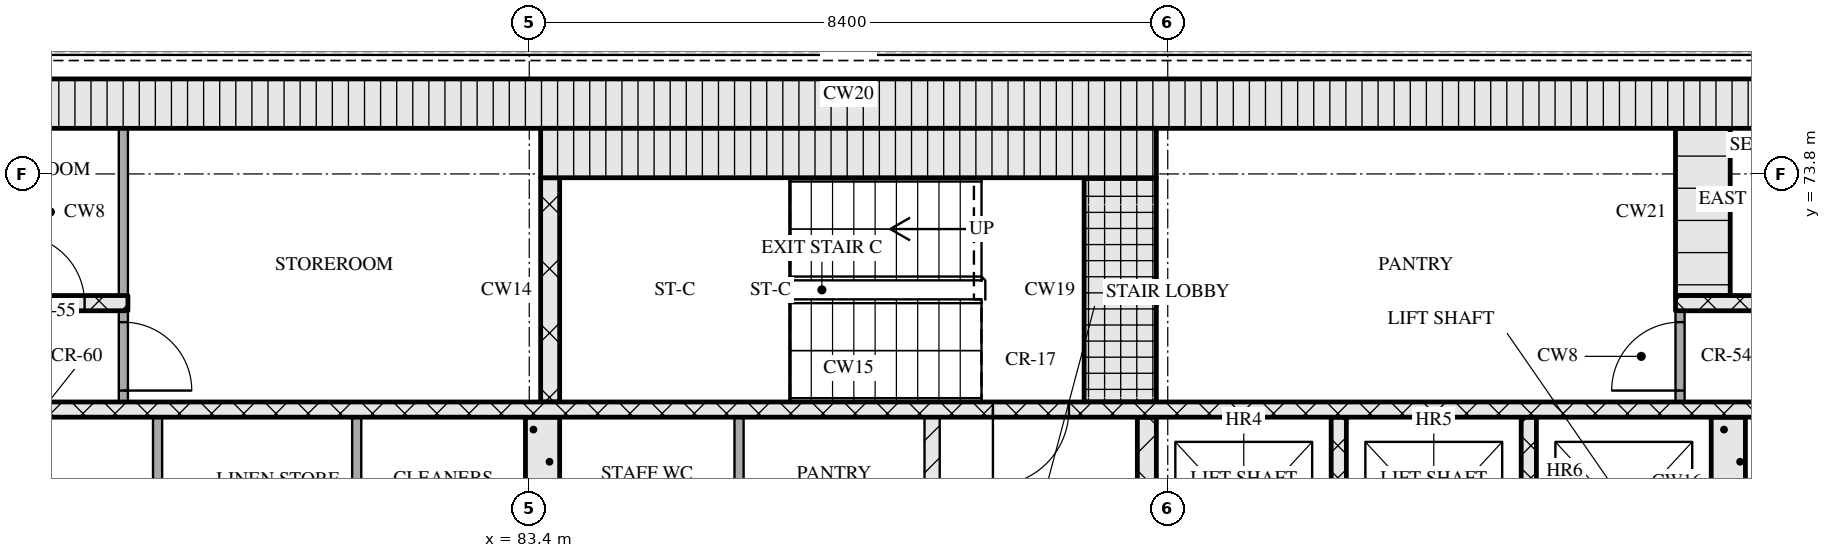
"""IFC4 building model, lengths in metres.
Left out: names, types, materials, properties, quantities, classifications, styles, units other than length and angle.
Written with IfcOpenShell. Run it as: python <this file> out.ifc"""

import sys

from ifc_helpers import new_model, si_unit, direction, frame, frame_2d, origin, place, context, subcontext, project, spatial, rectangle, extrude, element, fill, save


model = new_model("IFC4")
c1 = context("Model", 3, precision=1e-05, world=origin(), true_north=direction((0.0, 1.0)))
c2 = subcontext(c1, "Body", "Model", "MODEL_VIEW")
j1 = project(units=[si_unit("LENGTHUNIT", "METRE"), si_unit("PLANEANGLEUNIT", "RADIAN")], contexts=[c1])
p1 = place(None, origin())
s1 = spatial("IfcSite", under=j1, at=p1, CompositionType="ELEMENT")
p2 = place(p1, origin())
s2 = spatial("IfcBuilding", under=s1, at=p2, CompositionType="ELEMENT")
p3 = place(p2, frame((0.0, 0.0, 245.1)))
s3 = spatial("IfcBuildingStorey", under=s2, at=p3, CompositionType="ELEMENT", Elevation=245.1)
p4 = place(p3, frame((67.15, 74.725, 0.0), z_axis=(0.0, 0.0, 1.0), x_axis=(1.0, 0.0, 0.0)))
e1 = element("IfcWall", 1, at=p4, inside=s3, PredefinedType="SOLIDWALL", context=c2, shape_type="SweptSolid", body=[
    extrude(rectangle(XDim=40.9, YDim=0.65, at=frame_2d((20.45, 0.0))), origin(), (0.0, 0.0, 1.0), 3.32),
])
for number, where, z_axis, x_axis in (
    (2, (78.51, 68.0, 0.0), (0.0, 0.0, 1.0), (0.0, 1.0, 0.0)),
    (3, (81.13, 68.0, 0.0), (0.0, 0.0, 1.0), (0.0, 1.0, 0.0)),
):
    element("IfcWall", number, at=place(p3, frame(where, z_axis=z_axis, x_axis=x_axis)), inside=s3, PredefinedType="PARTITIONING", context=c2, shape_type="SweptSolid", body=[
        extrude(rectangle(XDim=2.6, YDim=0.12, at=frame_2d((1.3, 0.0))), origin(), (0.0, 0.0, 1.0), 3.32),
    ])
p5 = place(p3, frame((83.575, 68.0, 0.0), z_axis=(0.0, 0.0, 1.0), x_axis=(0.0, 1.0, 0.0)))
e4 = element("IfcWall", 4, at=p5, inside=s3, PredefinedType="SOLIDWALL", context=c2, shape_type="SweptSolid", body=[
    extrude(rectangle(XDim=2.6, YDim=0.45, at=frame_2d((1.3, 0.0))), origin(), (0.0, 0.0, 1.0), 3.32),
])
p6 = place(p3, frame((86.16, 68.0, 0.0), z_axis=(0.0, 0.0, 1.0), x_axis=(0.0, 1.0, 0.0)))
e5 = element("IfcWall", 5, at=p6, inside=s3, PredefinedType="PARTITIONING", context=c2, shape_type="SweptSolid", body=[
    extrude(rectangle(XDim=2.6, YDim=0.12, at=frame_2d((1.3, 0.0))), origin(), (0.0, 0.0, 1.0), 3.32),
])
p7 = place(p3, frame((88.7, 68.0, 0.0), z_axis=(0.0, 0.0, 1.0), x_axis=(0.0, 1.0, 0.0)))
e6 = element("IfcWall", 6, at=p7, inside=s3, PredefinedType="PARTITIONING", context=c2, shape_type="SweptSolid", body=[
    extrude(rectangle(XDim=2.6, YDim=0.2, at=frame_2d((1.3, 0.0))), origin(), (0.0, 0.0, 1.0), 3.32),
])
p8 = place(p3, frame((91.525, 68.0, 0.0), z_axis=(0.0, 0.0, 1.0), x_axis=(0.0, 1.0, 0.0)))
e7 = element("IfcWall", 7, at=p8, inside=s3, PredefinedType="SOLIDWALL", context=c2, shape_type="SweptSolid", body=[
    extrude(rectangle(XDim=2.6, YDim=0.25, at=frame_2d((1.3, 0.0))), origin(), (0.0, 0.0, 1.0), 3.32),
])
for number, where, z_axis, x_axis in (
    (8, (94.05, 68.0, 0.0), (0.0, 0.0, 1.0), (0.0, 1.0, 0.0)),
    (9, (96.55, 68.0, 0.0), (0.0, 0.0, 1.0), (0.0, 1.0, 0.0)),
):
    element("IfcWall", number, at=place(p3, frame(where, z_axis=z_axis, x_axis=x_axis)), inside=s3, PredefinedType="SOLIDWALL", context=c2, shape_type="SweptSolid", body=[
        extrude(rectangle(XDim=2.6, YDim=0.2, at=frame_2d((1.3, 0.0))), origin(), (0.0, 0.0, 1.0), 3.32),
    ])
p9 = place(p3, frame((99.175, 68.3, 0.0), z_axis=(0.0, 0.0, 1.0), x_axis=(0.0, 1.0, 0.0)))
e10 = element("IfcWall", 10, at=p9, inside=s3, PredefinedType="SOLIDWALL", context=c2, shape_type="SweptSolid", body=[
    extrude(rectangle(XDim=2.3, YDim=0.45, at=frame_2d((1.15, 0.0))), origin(), (0.0, 0.0, 1.0), 3.32),
])
p10 = place(p3, frame((67.8, 70.7, 0.0), z_axis=(0.0, 0.0, 1.0), x_axis=(1.0, 0.0, 0.0)))
e11 = element("IfcWall", 11, at=p10, inside=s3, PredefinedType="SOLIDWALL", context=c2, shape_type="SweptSolid", body=[
    extrude(rectangle(XDim=39.6, YDim=0.2, at=frame_2d((19.8, 0.0))), origin(), (0.0, 0.0, 1.0), 3.32),
])
p11 = place(p10, frame((0.65, 0.0, 0.0)))
e12 = element("IfcOpeningElement", 12, at=p11, cuts=e11, PredefinedType="OPENING", context=c2, shape_type="SweptSolid", body=[
    extrude(rectangle(XDim=1.1, YDim=2.1, at=frame_2d((0.55, 1.05))), frame((0.0, 0.11, 0.0), z_axis=(0.0, -1.0, 0.0), x_axis=(1.0, 0.0, 0.0)), (0.0, 0.0, 1.0), 0.22),
])
p12 = place(p10, frame((3.25, 0.0, 0.0)))
e13 = element("IfcOpeningElement", 13, at=p12, cuts=e11, PredefinedType="OPENING", context=c2, shape_type="SweptSolid", body=[
    extrude(rectangle(XDim=1.1, YDim=2.1, at=frame_2d((0.55, 1.05))), frame((0.0, 0.11, 0.0), z_axis=(0.0, -1.0, 0.0), x_axis=(1.0, 0.0, 0.0)), (0.0, 0.0, 1.0), 0.22),
])
p13 = place(p10, frame((5.9, 0.0, 0.0)))
e14 = element("IfcOpeningElement", 14, at=p13, cuts=e11, PredefinedType="OPENING", context=c2, shape_type="SweptSolid", body=[
    extrude(rectangle(XDim=1.0, YDim=2.1, at=frame_2d((0.5, 1.05))), frame((0.0, 0.11, 0.0), z_axis=(0.0, -1.0, 0.0), x_axis=(1.0, 0.0, 0.0)), (0.0, 0.0, 1.0), 0.22),
])
p14 = place(p10, frame((21.7, 0.0, 0.0)))
e15 = element("IfcOpeningElement", 15, at=p14, cuts=e11, PredefinedType="OPENING", context=c2, shape_type="SweptSolid", body=[
    extrude(rectangle(XDim=1.0, YDim=2.1, at=frame_2d((0.5, 1.05))), frame((0.0, 0.11, 0.0), z_axis=(0.0, -1.0, 0.0), x_axis=(1.0, 0.0, 0.0)), (0.0, 0.0, 1.0), 0.22),
])
p15 = place(p10, frame((32.7, 0.0, 0.0)))
e16 = element("IfcOpeningElement", 16, at=p15, cuts=e11, PredefinedType="OPENING", context=c2, shape_type="SweptSolid", body=[
    extrude(rectangle(XDim=1.0, YDim=2.1, at=frame_2d((0.5, 1.05))), frame((0.0, 0.11, 0.0), z_axis=(0.0, -1.0, 0.0), x_axis=(1.0, 0.0, 0.0)), (0.0, 0.0, 1.0), 0.22),
])
p16 = place(p10, frame((35.25, 0.0, 0.0)))
e17 = element("IfcOpeningElement", 17, at=p16, cuts=e11, PredefinedType="OPENING", context=c2, shape_type="SweptSolid", body=[
    extrude(rectangle(XDim=1.1, YDim=2.1, at=frame_2d((0.55, 1.05))), frame((0.0, 0.11, 0.0), z_axis=(0.0, -1.0, 0.0), x_axis=(1.0, 0.0, 0.0)), (0.0, 0.0, 1.0), 0.22),
])
p17 = place(p10, frame((37.85, 0.0, 0.0)))
e18 = element("IfcOpeningElement", 18, at=p17, cuts=e11, PredefinedType="OPENING", context=c2, shape_type="SweptSolid", body=[
    extrude(rectangle(XDim=1.1, YDim=2.1, at=frame_2d((0.55, 1.05))), frame((0.0, 0.11, 0.0), z_axis=(0.0, -1.0, 0.0), x_axis=(1.0, 0.0, 0.0)), (0.0, 0.0, 1.0), 0.22),
])
p18 = place(p3, frame((78.06, 70.8, 0.0), z_axis=(0.0, 0.0, 1.0), x_axis=(0.0, 1.0, 0.0)))
e19 = element("IfcWall", 19, at=p18, inside=s3, PredefinedType="PARTITIONING", context=c2, shape_type="SweptSolid", body=[
    extrude(rectangle(XDim=1.2, YDim=0.12, at=frame_2d((0.6, 0.0))), origin(), (0.0, 0.0, 1.0), 3.32),
])
p19 = place(p18, frame((0.15, 0.0, 0.0)))
e20 = element("IfcOpeningElement", 20, at=p19, cuts=e19, PredefinedType="OPENING", context=c2, shape_type="SweptSolid", body=[
    extrude(rectangle(XDim=0.9, YDim=2.1, at=frame_2d((0.45, 1.05))), frame((0.0, 0.07, 0.0), z_axis=(0.0, -1.0, 0.0), x_axis=(1.0, 0.0, 0.0)), (0.0, 0.0, 1.0), 0.14),
])
p20 = place(p3, frame((83.675, 70.8, 0.0), z_axis=(0.0, 0.0, 1.0), x_axis=(0.0, 1.0, 0.0)))
e21 = element("IfcWall", 21, at=p20, inside=s3, PredefinedType="SOLIDWALL", context=c2, shape_type="SweptSolid", body=[
    extrude(rectangle(XDim=2.95, YDim=0.25, at=frame_2d((1.475, 0.0))), origin(), (0.0, 0.0, 1.0), 3.32),
])
p21 = place(p3, frame((91.175, 70.8, 0.0), z_axis=(0.0, 0.0, 1.0), x_axis=(0.0, 1.0, 0.0)))
e22 = element("IfcWall", 22, at=p21, inside=s3, PredefinedType="SOLIDWALL", context=c2, shape_type="SweptSolid", body=[
    extrude(rectangle(XDim=2.95, YDim=0.95, at=frame_2d((1.475, 0.0))), origin(), (0.0, 0.0, 1.0), 3.32),
])
p22 = place(p3, frame((98.54, 70.8, 0.0), z_axis=(0.0, 0.0, 1.0), x_axis=(0.0, 1.0, 0.0)))
e23 = element("IfcWall", 23, at=p22, inside=s3, PredefinedType="PARTITIONING", context=c2, shape_type="SweptSolid", body=[
    extrude(rectangle(XDim=1.2, YDim=0.12, at=frame_2d((0.6, 0.0))), origin(), (0.0, 0.0, 1.0), 3.32),
])
p23 = place(p22, frame((0.15, 0.0, 0.0)))
e24 = element("IfcOpeningElement", 24, at=p23, cuts=e23, PredefinedType="OPENING", context=c2, shape_type="SweptSolid", body=[
    extrude(rectangle(XDim=0.9, YDim=2.1, at=frame_2d((0.45, 1.05))), frame((0.0, 0.07, 0.0), z_axis=(0.0, -1.0, 0.0), x_axis=(1.0, 0.0, 0.0)), (0.0, 0.0, 1.0), 0.14),
])
p24 = place(p3, frame((72.8, 72.1, 0.0), z_axis=(0.0, 0.0, 1.0), x_axis=(1.0, 0.0, 0.0)))
e25 = element("IfcWall", 25, at=p24, inside=s3, PredefinedType="SOLIDWALL", context=c2, shape_type="SweptSolid", body=[
    extrude(rectangle(XDim=5.32, YDim=0.2, at=frame_2d((2.66, 0.0))), origin(), (0.0, 0.0, 1.0), 3.32),
])
p25 = place(p24, frame((1.25, 0.0, 0.0)))
e26 = element("IfcOpeningElement", 26, at=p25, cuts=e25, PredefinedType="OPENING", context=c2, shape_type="SweptSolid", body=[
    extrude(rectangle(XDim=0.9, YDim=2.1, at=frame_2d((0.45, 1.05))), frame((0.0, 0.11, 0.0), z_axis=(0.0, -1.0, 0.0), x_axis=(1.0, 0.0, 0.0)), (0.0, 0.0, 1.0), 0.22),
])
p26 = place(p24, frame((3.85, 0.0, 0.0)))
e27 = element("IfcOpeningElement", 27, at=p26, cuts=e25, PredefinedType="OPENING", context=c2, shape_type="SweptSolid", body=[
    extrude(rectangle(XDim=0.9, YDim=2.1, at=frame_2d((0.45, 1.05))), frame((0.0, 0.11, 0.0), z_axis=(0.0, -1.0, 0.0), x_axis=(1.0, 0.0, 0.0)), (0.0, 0.0, 1.0), 0.22),
])
p27 = place(p3, frame((98.48, 72.1, 0.0), z_axis=(0.0, 0.0, 1.0), x_axis=(1.0, 0.0, 0.0)))
e28 = element("IfcWall", 28, at=p27, inside=s3, PredefinedType="SOLIDWALL", context=c2, shape_type="SweptSolid", body=[
    extrude(rectangle(XDim=3.92, YDim=0.2, at=frame_2d((1.96, 0.0))), origin(), (0.0, 0.0, 1.0), 3.32),
])
p28 = place(p27, frame((1.77, 0.0, 0.0)))
e29 = element("IfcOpeningElement", 29, at=p28, cuts=e28, PredefinedType="OPENING", context=c2, shape_type="SweptSolid", body=[
    extrude(rectangle(XDim=0.9, YDim=2.1, at=frame_2d((0.45, 1.05))), frame((0.0, 0.11, 0.0), z_axis=(0.0, -1.0, 0.0), x_axis=(1.0, 0.0, 0.0)), (0.0, 0.0, 1.0), 0.22),
])
p29 = place(p3, frame((78.06, 72.2, 0.0), z_axis=(0.0, 0.0, 1.0), x_axis=(0.0, 1.0, 0.0)))
e30 = element("IfcWall", 30, at=p29, inside=s3, PredefinedType="PARTITIONING", context=c2, shape_type="SweptSolid", body=[
    extrude(rectangle(XDim=2.2, YDim=0.12, at=frame_2d((1.1, 0.0))), origin(), (0.0, 0.0, 1.0), 3.32),
])
p30 = place(p3, frame((98.84, 72.2, 0.0), z_axis=(0.0, 0.0, 1.0), x_axis=(0.0, 1.0, 0.0)))
e31 = element("IfcWall", 31, at=p30, inside=s3, PredefinedType="SOLIDWALL", context=c2, shape_type="SweptSolid", body=[
    extrude(rectangle(XDim=2.2, YDim=0.72, at=frame_2d((1.1, 0.0))), origin(), (0.0, 0.0, 1.0), 3.32),
])
p31 = place(p3, frame((83.55, 74.075, 0.0), z_axis=(0.0, 0.0, 1.0), x_axis=(1.0, 0.0, 0.0)))
e32 = element("IfcWall", 32, at=p31, inside=s3, PredefinedType="SOLIDWALL", context=c2, shape_type="SweptSolid", body=[
    extrude(rectangle(XDim=8.1, YDim=0.65, at=frame_2d((4.05, 0.0))), origin(), (0.0, 0.0, 1.0), 3.32),
])
p32 = place(p14, origin())
e33 = element("IfcDoor", 33, at=p32, inside=s3, OperationType="SINGLE_SWING_RIGHT", PredefinedType="DOOR", context=c2, shape_type="SweptSolid", body=[
    extrude(rectangle(XDim=1.0, YDim=2.1, at=frame_2d((0.5, 1.05))), frame((0.0, 0.025, 0.0), z_axis=(0.0, -1.0, 0.0), x_axis=(1.0, 0.0, 0.0)), (0.0, 0.0, 1.0), 0.05),
])
fill(e15, e33)
p33 = place(p19, origin())
e34 = element("IfcDoor", 34, at=p33, inside=s3, OperationType="SINGLE_SWING_RIGHT", PredefinedType="DOOR", context=c2, shape_type="SweptSolid", body=[
    extrude(rectangle(XDim=0.9, YDim=2.1, at=frame_2d((0.45, 1.05))), frame((0.0, 0.025, 0.0), z_axis=(0.0, -1.0, 0.0), x_axis=(1.0, 0.0, 0.0)), (0.0, 0.0, 1.0), 0.05),
])
fill(e20, e34)
p34 = place(p23, origin())
e35 = element("IfcDoor", 35, at=p34, inside=s3, OperationType="SINGLE_SWING_LEFT", PredefinedType="DOOR", context=c2, shape_type="SweptSolid", body=[
    extrude(rectangle(XDim=0.9, YDim=2.1, at=frame_2d((0.45, 1.05))), frame((0.0, 0.025, 0.0), z_axis=(0.0, -1.0, 0.0), x_axis=(1.0, 0.0, 0.0)), (0.0, 0.0, 1.0), 0.05),
])
fill(e24, e35)
p35 = place(p26, origin())
e36 = element("IfcDoor", 36, at=p35, inside=s3, OperationType="SINGLE_SWING_LEFT", PredefinedType="DOOR", context=c2, shape_type="SweptSolid", body=[
    extrude(rectangle(XDim=0.9, YDim=2.1, at=frame_2d((0.45, 1.05))), frame((0.0, 0.025, 0.0), z_axis=(0.0, -1.0, 0.0), x_axis=(1.0, 0.0, 0.0)), (0.0, 0.0, 1.0), 0.05),
])
fill(e27, e36)
save(model, sys.argv[1])
